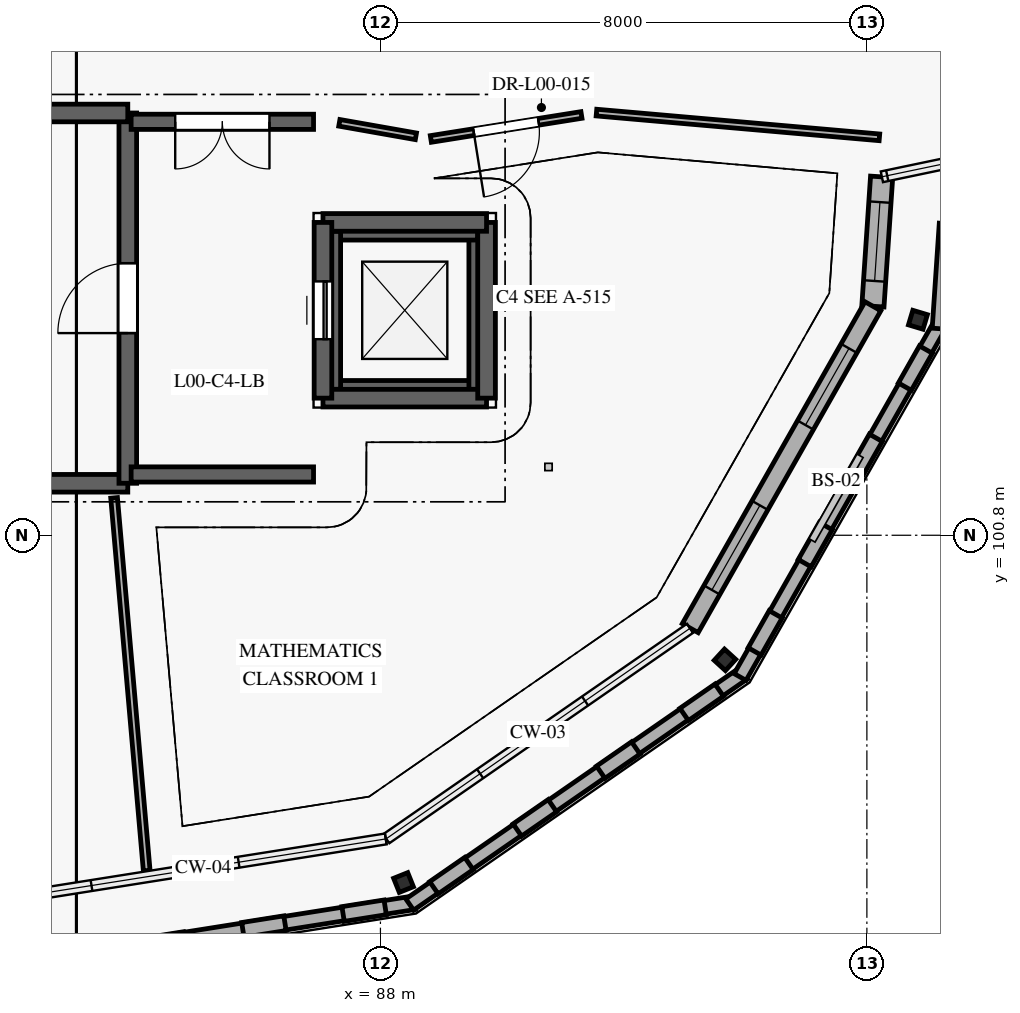
"""IFC4 building model, lengths in metres.
Left out: names, types, materials, properties, quantities, classifications, styles, units other than length and angle.
Written with IfcOpenShell. Run it as: python <this file> out.ifc"""

import sys

from ifc_helpers import new_model, si_unit, direction, frame, frame_2d, origin, origin_2d, place, context, subcontext, project, spatial, rectangle, hollow_rectangle, extrude, element, fill, save


model = new_model("IFC4")
c1 = context("Model", 3, precision=1e-05, world=origin(), true_north=direction((0.0, 1.0)))
c2 = subcontext(c1, "Body", "Model", "MODEL_VIEW")
j1 = project(units=[si_unit("LENGTHUNIT", "METRE"), si_unit("PLANEANGLEUNIT", "RADIAN")], contexts=[c1])
p1 = place(None, origin())
s1 = spatial("IfcSite", under=j1, at=p1, CompositionType="ELEMENT")
p2 = place(p1, origin())
s2 = spatial("IfcBuilding", under=s1, at=p2, CompositionType="ELEMENT")
p3 = place(p2, origin())
s3 = spatial("IfcBuildingStorey", under=s2, at=p3, CompositionType="ELEMENT", Elevation=0.0)
for number, where, z_axis, x_axis in (
    (1, (88.38, 95.089, 0.0), (0.0, 0.0, 1.0), (0.928, 0.372, 0.0)),
    (2, (93.666, 98.751, 0.0), (0.0, 0.0, 1.0), (0.675, 0.738, 0.0)),
    (3, (96.84, 104.344, 0.0), (0.0, 0.0, 1.0), (0.288, 0.958, 0.0)),
):
    element("IfcColumn", number, at=place(p3, frame(where, z_axis=z_axis, x_axis=x_axis)), inside=s3, PredefinedType="COLUMN", context=c2, shape_type="SweptSolid", body=[
        extrude(hollow_rectangle(XDim=0.25, YDim=0.25, WallThickness=0.012, InnerFilletRadius=0.012, OuterFilletRadius=0.019, at=origin_2d()), origin(), (0.0, 0.0, 1.0), 4.2),
    ])
p4 = place(p3, frame((96.243, 106.695, 0.0), z_axis=(0.0, 0.0, 1.0), x_axis=(-0.067309145793, -0.997732167915, 0.0)))
e4 = element("IfcWall", 4, at=p4, inside=s3, PredefinedType="SOLIDWALL", context=c2, shape_type="SweptSolid", body=[
    extrude(rectangle(XDim=2.133, YDim=0.365, at=frame_2d((1.066, 0.0))), origin(), (0.0, 0.0, 1.0), 3.94),
])
p5 = place(p4, frame((0.417, 0.0, 0.85)))
e5 = element("IfcOpeningElement", 5, at=p5, cuts=e4, PredefinedType="OPENING", context=c2, shape_type="SweptSolid", body=[
    extrude(rectangle(XDim=1.3, YDim=1.8, at=frame_2d((0.65, 0.9))), frame((0.0, 0.192, 0.0), z_axis=(0.0, -1.0, 0.0), x_axis=(1.0, 0.0, 0.0)), (0.0, 0.0, 1.0), 0.385),
])
p6 = place(p3, frame((96.099, 104.567, 0.0), z_axis=(0.0, 0.0, 1.0), x_axis=(-0.49349318979, -0.869749660322, 0.0)))
e6 = element("IfcWall", 6, at=p6, inside=s3, PredefinedType="SOLIDWALL", context=c2, shape_type="SweptSolid", body=[
    extrude(rectangle(XDim=6.087, YDim=0.3, at=frame_2d((3.043, 0.0))), origin(), (0.0, 0.0, 1.0), 3.94),
])
p7 = place(p6, frame((0.797, 0.0, 0.85)))
e7 = element("IfcOpeningElement", 7, at=p7, cuts=e6, PredefinedType="OPENING", context=c2, shape_type="SweptSolid", body=[
    extrude(rectangle(XDim=1.45, YDim=1.8, at=frame_2d((0.725, 0.9))), frame((0.0, 0.16, 0.0), z_axis=(0.0, -1.0, 0.0), x_axis=(1.0, 0.0, 0.0)), (0.0, 0.0, 1.0), 0.32),
])
p8 = place(p6, frame((3.765, 0.0, 0.85)))
e8 = element("IfcOpeningElement", 8, at=p8, cuts=e6, PredefinedType="OPENING", context=c2, shape_type="SweptSolid", body=[
    extrude(rectangle(XDim=1.6, YDim=1.8, at=frame_2d((0.8, 0.9))), frame((0.0, 0.16, 0.0), z_axis=(0.0, -1.0, 0.0), x_axis=(1.0, 0.0, 0.0)), (0.0, 0.0, 1.0), 0.32),
])
p9 = place(p3, frame((81.963, 93.712, 0.0), z_axis=(0.0, 0.0, 1.0), x_axis=(0.987690206406, 0.156422684322, 0.0)))
e9 = element("IfcWall", 9, at=p9, inside=s3, PredefinedType="ELEMENTEDWALL", context=c2, shape_type="SweptSolid", body=[
    extrude(rectangle(XDim=6.676, YDim=0.225, at=frame_2d((3.338, 0.0))), origin(), (0.0, 0.0, 1.0), 0.55),
])
for number, where, z_axis, x_axis in (
    (10, (84.089, 94.049, 0.55), (0.0, 0.0, 1.0), (0.988, 0.156, 0.0)),
    (11, (85.738, 94.31, 0.55), (0.0, 0.0, 1.0), (0.988, 0.156, 0.0)),
    (12, (87.386, 94.571, 0.55), (0.0, 0.0, 1.0), (0.988, 0.156, 0.0)),
):
    element("IfcWall", number, at=place(p3, frame(where, z_axis=z_axis, x_axis=x_axis)), inside=s3, PredefinedType="ELEMENTEDWALL", context=c2, shape_type="SweptSolid", body=[
        extrude(rectangle(XDim=0.701, YDim=0.245, at=frame_2d((0.351, 0.0))), origin(), (0.0, 0.0, 1.0), 3.39),
    ])
p10 = place(p3, frame((88.482, 94.726, 0.0), z_axis=(0.0, 0.0, 1.0), x_axis=(0.822009139105, 0.56947429725, 0.0)))
e13 = element("IfcWall", 13, at=p10, inside=s3, PredefinedType="ELEMENTEDWALL", context=c2, shape_type="SweptSolid", body=[
    extrude(rectangle(XDim=6.676, YDim=0.225, at=frame_2d((3.338, 0.0))), origin(), (0.0, 0.0, 1.0), 0.55),
])
for number, where, z_axis, x_axis in (
    (14, (88.88, 95.002, 0.55), (0.0, 0.0, 1.0), (0.822, 0.569, 0.0)),
    (15, (90.252, 95.952, 0.55), (0.0, 0.0, 1.0), (0.822, 0.569, 0.0)),
):
    element("IfcWall", number, at=place(p3, frame(where, z_axis=z_axis, x_axis=x_axis)), inside=s3, PredefinedType="ELEMENTEDWALL", context=c2, shape_type="SweptSolid", body=[
        extrude(rectangle(XDim=0.701, YDim=0.245, at=frame_2d((0.351, 0.0))), origin(), (0.0, 0.0, 1.0), 3.39),
    ])
p11 = place(p3, frame((91.623, 96.903, 0.55), z_axis=(0.0, 0.0, 1.0), x_axis=(0.821953993254, 0.569553889438, 0.0)))
e16 = element("IfcWall", 16, at=p11, inside=s3, PredefinedType="ELEMENTEDWALL", context=c2, shape_type="SweptSolid", body=[
    extrude(rectangle(XDim=0.701, YDim=0.245, at=frame_2d((0.351, 0.0))), origin(), (0.0, 0.0, 1.0), 3.39),
])
p12 = place(p3, frame((92.995, 97.853, 0.55), z_axis=(0.0, 0.0, 1.0), x_axis=(0.822004061083, 0.569481627064, 0.0)))
e17 = element("IfcWall", 17, at=p12, inside=s3, PredefinedType="ELEMENTEDWALL", context=c2, shape_type="SweptSolid", body=[
    extrude(rectangle(XDim=0.701, YDim=0.245, at=frame_2d((0.351, 0.0))), origin(), (0.0, 0.0, 1.0), 3.39),
])
p13 = place(p3, frame((93.915, 98.469, 0.0), z_axis=(0.0, 0.0, 1.0), x_axis=(0.493497861667, 0.869747009498, 0.0)))
e18 = element("IfcWall", 18, at=p13, inside=s3, PredefinedType="ELEMENTEDWALL", context=c2, shape_type="SweptSolid", body=[
    extrude(rectangle(XDim=6.676, YDim=0.225, at=frame_2d((3.338, 0.0))), origin(), (0.0, 0.0, 1.0), 0.55),
])
for number, where, z_axis, x_axis in (
    (19, (94.154, 98.89, 0.55), (0.0, 0.0, 1.0), (0.494, 0.87, 0.0)),
    (20, (94.978, 100.341, 0.55), (0.0, 0.0, 1.0), (0.493, 0.87, 0.0)),
    (21, (95.801, 101.793, 0.55), (0.0, 0.0, 1.0), (0.494, 0.87, 0.0)),
):
    element("IfcWall", number, at=place(p3, frame(where, z_axis=z_axis, x_axis=x_axis)), inside=s3, PredefinedType="ELEMENTEDWALL", context=c2, shape_type="SweptSolid", body=[
        extrude(rectangle(XDim=0.701, YDim=0.245, at=frame_2d((0.351, 0.0))), origin(), (0.0, 0.0, 1.0), 3.39),
    ])
p14 = place(p3, frame((96.625, 103.244, 0.55), z_axis=(0.0, 0.0, 1.0), x_axis=(0.49339908657, 0.869803047461, 0.0)))
e22 = element("IfcWall", 22, at=p14, inside=s3, PredefinedType="ELEMENTEDWALL", context=c2, shape_type="SweptSolid", body=[
    extrude(rectangle(XDim=0.701, YDim=0.245, at=frame_2d((0.351, 0.0))), origin(), (0.0, 0.0, 1.0), 3.39),
])
p15 = place(p3, frame((97.187, 104.198, 0.0), z_axis=(0.0, 0.0, 1.0), x_axis=(0.067258320943, 0.997735595368, 0.0)))
e23 = element("IfcWall", 23, at=p15, inside=s3, PredefinedType="ELEMENTEDWALL", context=c2, shape_type="SweptSolid", body=[
    extrude(rectangle(XDim=1.731, YDim=0.225, at=frame_2d((0.866, 0.0))), origin(), (0.0, 0.0, 1.0), 0.55),
])
p16 = place(p3, frame((87.2, 103.2, -1.4), z_axis=(0.0, 0.0, 1.0), x_axis=(1.0, 0.0, 0.0)))
e24 = element("IfcWall", 24, at=p16, inside=s3, PredefinedType="SHEAR", context=c2, shape_type="SweptSolid", body=[
    extrude(rectangle(XDim=2.4, YDim=0.29, at=frame_2d((1.2, 0.0))), origin(), (0.0, 0.0, 1.0), 1.4),
])
p17 = place(p3, frame((89.6, 103.2, -1.4), z_axis=(0.0, 0.0, 1.0), x_axis=(0.0, 1.0, 0.0)))
e25 = element("IfcWall", 25, at=p17, inside=s3, PredefinedType="SHEAR", context=c2, shape_type="SweptSolid", body=[
    extrude(rectangle(XDim=2.6, YDim=0.29, at=frame_2d((1.3, 0.0))), origin(), (0.0, 0.0, 1.0), 1.4),
])
p18 = place(p3, frame((89.6, 105.8, -1.4), z_axis=(0.0, 0.0, 1.0), x_axis=(-1.0, 0.0, 0.0)))
e26 = element("IfcWall", 26, at=p18, inside=s3, PredefinedType="SHEAR", context=c2, shape_type="SweptSolid", body=[
    extrude(rectangle(XDim=2.4, YDim=0.29, at=frame_2d((1.2, 0.0))), origin(), (0.0, 0.0, 1.0), 1.4),
])
p19 = place(p3, frame((87.2, 105.8, -1.4), z_axis=(0.0, 0.0, 1.0), x_axis=(0.0, -1.0, 0.0)))
e27 = element("IfcWall", 27, at=p19, inside=s3, PredefinedType="SHEAR", context=c2, shape_type="SweptSolid", body=[
    extrude(rectangle(XDim=2.6, YDim=0.29, at=frame_2d((1.3, 0.0))), origin(), (0.0, 0.0, 1.0), 1.4),
])
p20 = place(p3, frame((77.055, 101.655, 0.0), z_axis=(0.0, 0.0, 1.0), x_axis=(1.0, 0.0, 0.0)))
e28 = element("IfcWall", 28, at=p20, inside=s3, PredefinedType="SHEAR", context=c2, shape_type="SweptSolid", body=[
    extrude(rectangle(XDim=6.79, YDim=0.29, at=frame_2d((3.395, 0.0))), origin(), (0.0, 0.0, 1.0), 3.95),
])
p21 = place(p3, frame((83.845, 101.655, 0.0), z_axis=(0.0, 0.0, 1.0), x_axis=(0.0, 1.0, 0.0)))
e29 = element("IfcWall", 29, at=p21, inside=s3, PredefinedType="SHEAR", context=c2, shape_type="SweptSolid", body=[
    extrude(rectangle(XDim=6.09, YDim=0.29, at=frame_2d((3.045, 0.0))), origin(), (0.0, 0.0, 1.0), 3.95),
])
p22 = place(p21, frame((2.47, 0.0, 0.0)))
e30 = element("IfcOpeningElement", 30, at=p22, cuts=e29, PredefinedType="OPENING", context=c2, shape_type="SweptSolid", body=[
    extrude(rectangle(XDim=1.15, YDim=2.1, at=frame_2d((0.575, 1.05))), frame((0.0, 0.155, 0.0), z_axis=(0.0, -1.0, 0.0), x_axis=(1.0, 0.0, 0.0)), (0.0, 0.0, 1.0), 0.31),
])
p23 = place(p3, frame((83.845, 107.745, 0.0), z_axis=(0.0, 0.0, 1.0), x_axis=(-1.0, 0.0, 0.0)))
e31 = element("IfcWall", 31, at=p23, inside=s3, PredefinedType="SHEAR", context=c2, shape_type="SweptSolid", body=[
    extrude(rectangle(XDim=6.79, YDim=0.29, at=frame_2d((3.395, 0.0))), origin(), (0.0, 0.0, 1.0), 3.95),
])
p24 = place(p3, frame((87.055, 103.055, 0.0), z_axis=(0.0, 0.0, 1.0), x_axis=(1.0, 0.0, 0.0)))
e32 = element("IfcWall", 32, at=p24, inside=s3, PredefinedType="SHEAR", context=c2, shape_type="SweptSolid", body=[
    extrude(rectangle(XDim=2.69, YDim=0.29, at=frame_2d((1.345, 0.0))), origin(), (0.0, 0.0, 1.0), 3.95),
])
p25 = place(p3, frame((89.745, 103.055, 0.0), z_axis=(0.0, 0.0, 1.0), x_axis=(0.0, 1.0, 0.0)))
e33 = element("IfcWall", 33, at=p25, inside=s3, PredefinedType="SHEAR", context=c2, shape_type="SweptSolid", body=[
    extrude(rectangle(XDim=2.89, YDim=0.29, at=frame_2d((1.445, 0.0))), origin(), (0.0, 0.0, 1.0), 3.95),
])
p26 = place(p3, frame((89.745, 105.945, 0.0), z_axis=(0.0, 0.0, 1.0), x_axis=(-1.0, 0.0, 0.0)))
e34 = element("IfcWall", 34, at=p26, inside=s3, PredefinedType="SHEAR", context=c2, shape_type="SweptSolid", body=[
    extrude(rectangle(XDim=2.69, YDim=0.29, at=frame_2d((1.345, 0.0))), origin(), (0.0, 0.0, 1.0), 3.95),
])
p27 = place(p3, frame((87.055, 105.945, 0.0), z_axis=(0.0, 0.0, 1.0), x_axis=(0.0, -1.0, 0.0)))
e35 = element("IfcWall", 35, at=p27, inside=s3, PredefinedType="SHEAR", context=c2, shape_type="SweptSolid", body=[
    extrude(rectangle(XDim=2.89, YDim=0.29, at=frame_2d((1.445, 0.0))), origin(), (0.0, 0.0, 1.0), 3.95),
])
p28 = place(p27, frame((0.97, 0.0, 0.0)))
e36 = element("IfcOpeningElement", 36, at=p28, cuts=e35, PredefinedType="OPENING", context=c2, shape_type="SweptSolid", body=[
    extrude(rectangle(XDim=0.95, YDim=2.1, at=frame_2d((0.475, 1.05))), frame((0.0, 0.155, 0.0), z_axis=(0.0, -1.0, 0.0), x_axis=(1.0, 0.0, 0.0)), (0.0, 0.0, 1.0), 0.31),
])
p29 = place(p3, frame((83.9, 101.8, 0.0), z_axis=(0.0, 0.0, 1.0), x_axis=(1.0, 0.0, 0.0)))
e37 = element("IfcWall", 37, at=p29, inside=s3, PredefinedType="SHEAR", context=c2, shape_type="SweptSolid", body=[
    extrude(rectangle(XDim=3.0, YDim=0.25, at=frame_2d((1.5, 0.0))), origin(), (0.0, 0.0, 1.0), 3.95),
])
p30 = place(p3, frame((86.9, 107.6, 0.0), z_axis=(0.0, 0.0, 1.0), x_axis=(-1.0, 0.0, 0.0)))
e38 = element("IfcWall", 38, at=p30, inside=s3, PredefinedType="SHEAR", context=c2, shape_type="SweptSolid", body=[
    extrude(rectangle(XDim=3.0, YDim=0.25, at=frame_2d((1.5, 0.0))), origin(), (0.0, 0.0, 1.0), 3.95),
])
p31 = place(p30, frame((0.725, 0.0, 0.0)))
e39 = element("IfcOpeningElement", 39, at=p31, cuts=e38, PredefinedType="OPENING", context=c2, shape_type="SweptSolid", body=[
    extrude(rectangle(XDim=1.55, YDim=2.15, at=frame_2d((0.775, 1.075))), frame((0.0, 0.135, 0.0), z_axis=(0.0, -1.0, 0.0), x_axis=(1.0, 0.0, 0.0)), (0.0, 0.0, 1.0), 0.27),
])
p32 = place(p3, frame((83.62, 101.415, 0.0), z_axis=(0.0, 0.0, 1.0), x_axis=(0.087155139679, -0.996194750853, 0.0)))
e40 = element("IfcWall", 40, at=p32, inside=s3, PredefinedType="PARTITIONING", context=c2, shape_type="SweptSolid", body=[
    extrude(rectangle(XDim=6.154, YDim=0.11, at=frame_2d((3.077, 0.0))), origin(), (0.0, 0.0, 1.0), 3.93),
])
p33 = place(p3, frame((96.206, 107.344, 0.0), z_axis=(0.0, 0.0, 1.0), x_axis=(-0.996193377134, 0.087170840051, 0.0)))
e41 = element("IfcWall", 41, at=p33, inside=s3, PredefinedType="PARTITIONING", context=c2, shape_type="SweptSolid", body=[
    extrude(rectangle(XDim=4.672, YDim=0.11, at=frame_2d((2.336, 0.0))), origin(), (0.0, 0.0, 1.0), 3.93),
])
p34 = place(p3, frame((91.306, 107.712, 0.0), z_axis=(0.0, 0.0, 1.0), x_axis=(-0.987549736028, -0.157307084615, 0.0)))
e42 = element("IfcWall", 42, at=p34, inside=s3, PredefinedType="PARTITIONING", context=c2, shape_type="SweptSolid", body=[
    extrude(rectangle(XDim=2.508, YDim=0.11, at=frame_2d((1.254, 0.0))), origin(), (0.0, 0.0, 1.0), 3.93),
])
p35 = place(p34, frame((0.714, 0.0, 0.0)))
e43 = element("IfcOpeningElement", 43, at=p35, cuts=e42, PredefinedType="OPENING", context=c2, shape_type="SweptSolid", body=[
    extrude(rectangle(XDim=1.08, YDim=2.12, at=frame_2d((0.54, 1.06))), frame((0.0, 0.065, 0.0), z_axis=(0.0, -1.0, 0.0), x_axis=(1.0, 0.0, 0.0)), (0.0, 0.0, 1.0), 0.13),
])
p36 = place(p3, frame((88.583, 107.361, 0.0), z_axis=(0.0, 0.0, 1.0), x_axis=(-0.984779713003, 0.173807125452, 0.0)))
e44 = element("IfcWall", 44, at=p36, inside=s3, PredefinedType="PARTITIONING", context=c2, shape_type="SweptSolid", body=[
    extrude(rectangle(XDim=1.278, YDim=0.11, at=frame_2d((0.639, 0.0))), origin(), (0.0, 0.0, 1.0), 3.93),
])
p37 = place(p5, origin())
e45 = element("IfcWindow", 45, at=p37, inside=s3, PartitioningType="SINGLE_PANEL", PredefinedType="WINDOW", context=c2, shape_type="SweptSolid", body=[
    extrude(rectangle(XDim=1.3, YDim=1.8, at=frame_2d((0.65, 0.9))), frame((0.0, 0.03, 0.0), z_axis=(0.0, -1.0, 0.0), x_axis=(1.0, 0.0, 0.0)), (0.0, 0.0, 1.0), 0.06),
])
fill(e5, e45)
p38 = place(p7, origin())
e46 = element("IfcWindow", 46, at=p38, inside=s3, PartitioningType="SINGLE_PANEL", PredefinedType="WINDOW", context=c2, shape_type="SweptSolid", body=[
    extrude(rectangle(XDim=1.45, YDim=1.8, at=frame_2d((0.725, 0.9))), frame((0.0, 0.03, 0.0), z_axis=(0.0, -1.0, 0.0), x_axis=(1.0, 0.0, 0.0)), (0.0, 0.0, 1.0), 0.06),
])
fill(e7, e46)
p39 = place(p8, origin())
e47 = element("IfcWindow", 47, at=p39, inside=s3, PartitioningType="SINGLE_PANEL", PredefinedType="WINDOW", context=c2, shape_type="SweptSolid", body=[
    extrude(rectangle(XDim=1.6, YDim=1.8, at=frame_2d((0.8, 0.9))), frame((0.0, 0.03, 0.0), z_axis=(0.0, -1.0, 0.0), x_axis=(1.0, 0.0, 0.0)), (0.0, 0.0, 1.0), 0.06),
])
fill(e8, e47)
p40 = place(p22, frame((1.15, 0.0, 0.0), z_axis=(0.0, 0.0, 1.0), x_axis=(-1.0, 0.0, 0.0)))
e48 = element("IfcDoor", 48, at=p40, inside=s3, OperationType="SINGLE_SWING_LEFT", PredefinedType="DOOR", context=c2, shape_type="SweptSolid", body=[
    extrude(rectangle(XDim=1.15, YDim=2.1, at=frame_2d((0.575, 1.05))), frame((0.0, 0.025, 0.0), z_axis=(0.0, -1.0, 0.0), x_axis=(1.0, 0.0, 0.0)), (0.0, 0.0, 1.0), 0.05),
])
fill(e30, e48)
p41 = place(p28, frame((0.95, 0.0, 0.0), z_axis=(0.0, 0.0, 1.0), x_axis=(-1.0, 0.0, 0.0)))
e49 = element("IfcDoor", 49, at=p41, inside=s3, OperationType="SLIDING_TO_LEFT", PredefinedType="DOOR", context=c2, shape_type="SweptSolid", body=[
    extrude(rectangle(XDim=0.95, YDim=2.1, at=frame_2d((0.475, 1.05))), frame((0.0, 0.025, 0.0), z_axis=(0.0, -1.0, 0.0), x_axis=(1.0, 0.0, 0.0)), (0.0, 0.0, 1.0), 0.05),
])
fill(e36, e49)
p42 = place(p31, frame((1.55, 0.0, 0.0), z_axis=(0.0, 0.0, 1.0), x_axis=(-1.0, 0.0, 0.0)))
e50 = element("IfcDoor", 50, at=p42, inside=s3, OperationType="DOUBLE_DOOR_SINGLE_SWING", PredefinedType="DOOR", context=c2, shape_type="SweptSolid", body=[
    extrude(rectangle(XDim=1.55, YDim=2.15, at=frame_2d((0.775, 1.075))), frame((0.0, 0.025, 0.0), z_axis=(0.0, -1.0, 0.0), x_axis=(1.0, 0.0, 0.0)), (0.0, 0.0, 1.0), 0.05),
])
fill(e39, e50)
p43 = place(p35, origin())
e51 = element("IfcDoor", 51, at=p43, inside=s3, OperationType="SINGLE_SWING_RIGHT", PredefinedType="DOOR", context=c2, shape_type="SweptSolid", body=[
    extrude(rectangle(XDim=1.08, YDim=2.12, at=frame_2d((0.54, 1.06))), frame((0.0, 0.025, 0.0), z_axis=(0.0, -1.0, 0.0), x_axis=(1.0, 0.0, 0.0)), (0.0, 0.0, 1.0), 0.05),
])
fill(e43, e51)
save(model, sys.argv[1])
